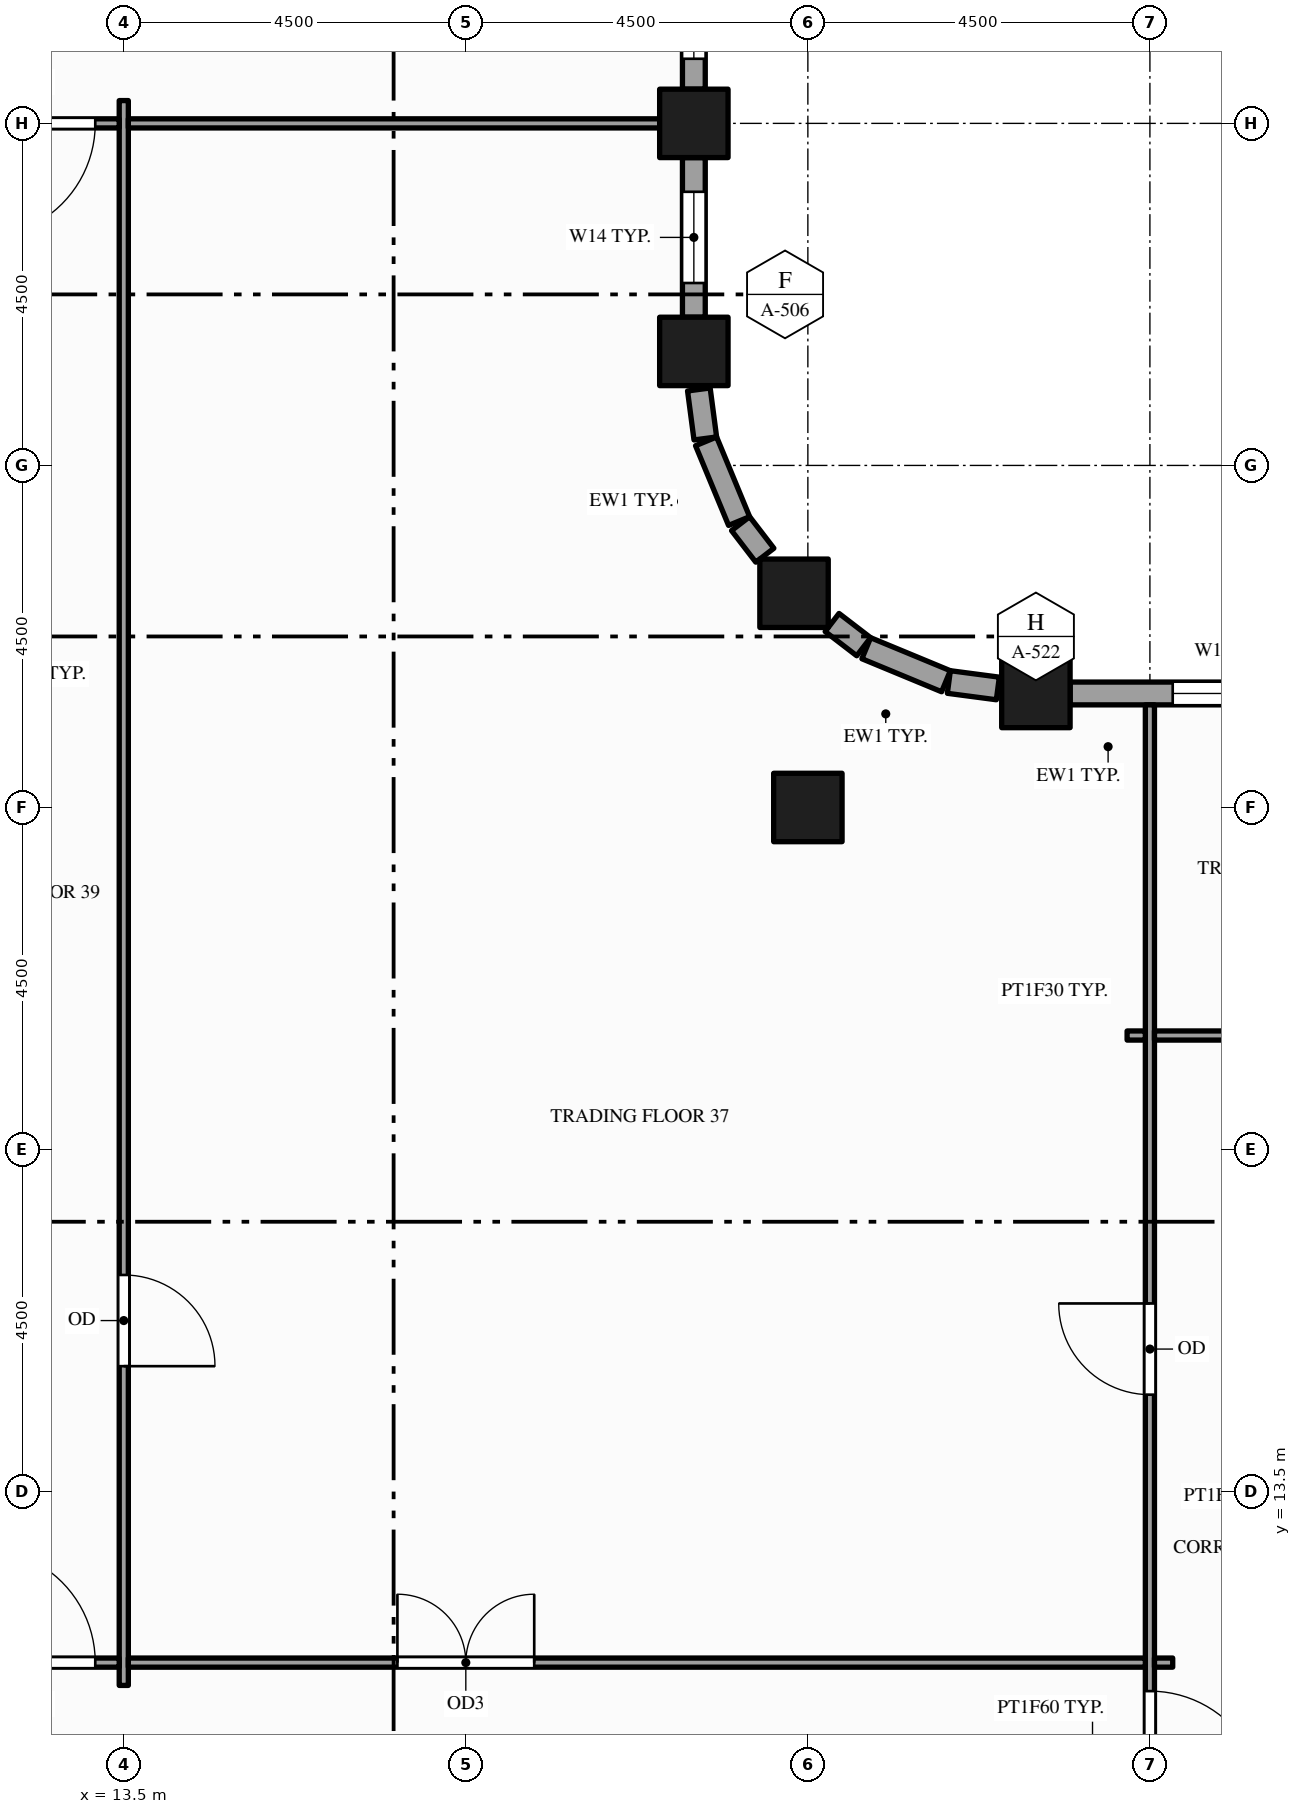
"""IFC4 building model, lengths in metres.
Left out: names, types, materials, properties, quantities, classifications, styles, units other than length and angle.
Written with IfcOpenShell. Run it as: python <this file> out.ifc"""

import sys

from ifc_helpers import new_model, si_unit, direction, frame, frame_2d, origin, origin_2d, place, context, subcontext, project, spatial, rectangle, hollow_rectangle, extrude, element, fill, save


model = new_model("IFC4")
c1 = context("Model", 3, precision=1e-05, world=origin(), true_north=direction((0.0, 1.0)))
c2 = subcontext(c1, "Body", "Model", "MODEL_VIEW")
j1 = project(units=[si_unit("LENGTHUNIT", "METRE"), si_unit("PLANEANGLEUNIT", "RADIAN")], contexts=[c1])
p1 = place(None, origin())
s1 = spatial("IfcSite", under=j1, at=p1, CompositionType="ELEMENT")
p2 = place(p1, origin())
s2 = spatial("IfcBuilding", under=s1, at=p2, CompositionType="ELEMENT")
p3 = place(p2, frame((0.0, 0.0, 183.0)))
s3 = spatial("IfcBuildingStorey", under=s2, at=p3, CompositionType="ELEMENT", Elevation=183.0)
for number, where, z_axis, x_axis in (
    (1, (21.0, 28.5, -0.15), (0.0, 0.0, 1.0), (1.0, 0.0, 0.0)),
    (2, (21.0, 31.5, -0.15), (0.0, 0.0, 1.0), (1.0, 0.0, 0.0)),
    (3, (22.318, 25.318, -0.15), (0.0, 0.0, 1.0), (1.0, 0.0, 0.0)),
    (4, (22.5, 22.5, -0.15), (0.0, 0.0, 1.0), (1.0, 0.0, 0.0)),
    (5, (25.5, 24.0, -0.15), (0.0, 0.0, 1.0), (1.0, 0.0, 0.0)),
):
    element("IfcColumn", number, at=place(p3, frame(where, z_axis=z_axis, x_axis=x_axis)), inside=s3, PredefinedType="COLUMN", context=c2, shape_type="SweptSolid", body=[
        extrude(hollow_rectangle(XDim=0.9, YDim=0.9, WallThickness=0.045, at=origin_2d()), origin(), (0.0, 0.0, 1.0), 3.9),
    ])
p4 = place(p3, frame((31.05, 24.0, 0.0), z_axis=(0.0, 0.0, 1.0), x_axis=(-1.0, 0.0, 0.0)))
e6 = element("IfcWall", 6, at=p4, inside=s3, PredefinedType="STANDARD", context=c2, shape_type="SweptSolid", body=[
    extrude(rectangle(XDim=5.1, YDim=0.3, at=frame_2d((2.55, 0.0))), origin(), (0.0, 0.0, 1.0), 3.049),
])
p5 = place(p4, frame((0.4, 0.0, 0.9)))
e7 = element("IfcOpeningElement", 7, at=p5, cuts=e6, PredefinedType="OPENING", context=c2, shape_type="SweptSolid", body=[
    extrude(rectangle(XDim=1.1, YDim=2.0, at=frame_2d((0.55, 1.0))), frame((0.0, 0.16, 0.0), z_axis=(0.0, -1.0, 0.0), x_axis=(1.0, 0.0, 0.0)), (0.0, 0.0, 1.0), 0.32),
])
p6 = place(p4, frame((2.1, 0.0, 0.9)))
e8 = element("IfcOpeningElement", 8, at=p6, cuts=e6, PredefinedType="OPENING", context=c2, shape_type="SweptSolid", body=[
    extrude(rectangle(XDim=1.65, YDim=2.0, at=frame_2d((0.825, 1.0))), frame((0.0, 0.16, 0.0), z_axis=(0.0, -1.0, 0.0), x_axis=(1.0, 0.0, 0.0)), (0.0, 0.0, 1.0), 0.32),
])
p7 = place(p3, frame((25.0, 24.066, 0.0), z_axis=(0.0, 0.0, 1.0), x_axis=(-0.991423590996, 0.130687655177, 0.0)))
e9 = element("IfcWall", 9, at=p7, inside=s3, PredefinedType="STANDARD", context=c2, shape_type="SweptSolid", body=[
    extrude(rectangle(XDim=0.65, YDim=0.3, at=frame_2d((0.325, 0.0))), origin(), (0.0, 0.0, 1.0), 2.35),
])
p8 = place(p3, frame((24.317, 24.161, 0.0), z_axis=(0.0, 0.0, 1.0), x_axis=(-0.923914616768, 0.382598720491, 0.0)))
e10 = element("IfcWall", 10, at=p8, inside=s3, PredefinedType="STANDARD", context=c2, shape_type="SweptSolid", body=[
    extrude(rectangle(XDim=1.135, YDim=0.3, at=frame_2d((0.568, 0.0))), origin(), (0.0, 0.0, 1.0), 2.35),
])
for number, where, z_axis, x_axis in (
    (11, (23.234, 24.615, 0.0), (0.0, 0.0, 1.0), (-0.794, 0.609, 0.0)),
    (12, (21.934, 25.819, 0.0), (0.0, 0.0, 1.0), (-0.609, 0.794, 0.0)),
):
    element("IfcWall", number, at=place(p3, frame(where, z_axis=z_axis, x_axis=x_axis)), inside=s3, PredefinedType="STANDARD", context=c2, shape_type="SweptSolid", body=[
        extrude(rectangle(XDim=0.524, YDim=0.3, at=frame_2d((0.262, 0.0))), origin(), (0.0, 0.0, 1.0), 3.049),
    ])
p9 = place(p3, frame((21.595, 26.268, 0.0), z_axis=(0.0, 0.0, 1.0), x_axis=(-0.382598720491, 0.923914616768, 0.0)))
e13 = element("IfcWall", 13, at=p9, inside=s3, PredefinedType="STANDARD", context=c2, shape_type="SweptSolid", body=[
    extrude(rectangle(XDim=1.135, YDim=0.3, at=frame_2d((0.568, 0.0))), origin(), (0.0, 0.0, 1.0), 3.049),
])
p10 = place(p3, frame((21.151, 27.355, 0.0), z_axis=(0.0, 0.0, 1.0), x_axis=(-0.130687655177, 0.991423590996, 0.0)))
e14 = element("IfcWall", 14, at=p10, inside=s3, PredefinedType="STANDARD", context=c2, shape_type="SweptSolid", body=[
    extrude(rectangle(XDim=0.65, YDim=0.3, at=frame_2d((0.325, 0.0))), origin(), (0.0, 0.0, 1.0), 3.049),
])
p11 = place(p3, frame((21.0, 28.95, 0.0), z_axis=(0.0, 0.0, 1.0), x_axis=(0.0, 1.0, 0.0)))
e15 = element("IfcWall", 15, at=p11, inside=s3, PredefinedType="STANDARD", context=c2, shape_type="SweptSolid", body=[
    extrude(rectangle(XDim=2.1, YDim=0.3, at=frame_2d((1.05, 0.0))), origin(), (0.0, 0.0, 1.0), 3.049),
])
p12 = place(p11, frame((0.45, 0.0, 0.9)))
e16 = element("IfcOpeningElement", 16, at=p12, cuts=e15, PredefinedType="OPENING", context=c2, shape_type="SweptSolid", body=[
    extrude(rectangle(XDim=1.2, YDim=2.0, at=frame_2d((0.6, 1.0))), frame((0.0, 0.16, 0.0), z_axis=(0.0, -1.0, 0.0), x_axis=(1.0, 0.0, 0.0)), (0.0, 0.0, 1.0), 0.32),
])
p13 = place(p3, frame((21.0, 31.95, 0.0), z_axis=(0.0, 0.0, 1.0), x_axis=(0.0, 1.0, 0.0)))
e17 = element("IfcWall", 17, at=p13, inside=s3, PredefinedType="STANDARD", context=c2, shape_type="SweptSolid", body=[
    extrude(rectangle(XDim=4.05, YDim=0.3, at=frame_2d((2.025, 0.0))), origin(), (0.0, 0.0, 1.0), 3.049),
])
p14 = place(p13, frame((0.4, 0.0, 0.9)))
e18 = element("IfcOpeningElement", 18, at=p14, cuts=e17, PredefinedType="OPENING", context=c2, shape_type="SweptSolid", body=[
    extrude(rectangle(XDim=1.1, YDim=2.0, at=frame_2d((0.55, 1.0))), frame((0.0, 0.16, 0.0), z_axis=(0.0, -1.0, 0.0), x_axis=(1.0, 0.0, 0.0)), (0.0, 0.0, 1.0), 0.32),
])
p15 = place(p13, frame((2.1, 0.0, 0.9)))
e19 = element("IfcOpeningElement", 19, at=p15, cuts=e17, PredefinedType="OPENING", context=c2, shape_type="SweptSolid", body=[
    extrude(rectangle(XDim=1.55, YDim=2.0, at=frame_2d((0.775, 1.0))), frame((0.0, 0.16, 0.0), z_axis=(0.0, -1.0, 0.0), x_axis=(1.0, 0.0, 0.0)), (0.0, 0.0, 1.0), 0.32),
])
p16 = place(p3, frame((13.5, 10.95, 0.0), z_axis=(0.0, 0.0, 1.0), x_axis=(0.0, 1.0, 0.0)))
e20 = element("IfcWall", 20, at=p16, inside=s3, PredefinedType="PARTITIONING", context=c2, shape_type="SweptSolid", body=[
    extrude(rectangle(XDim=20.85, YDim=0.12, at=frame_2d((10.425, 0.0))), origin(), (0.0, 0.0, 1.0), 2.5),
])
p17 = place(p16, frame((4.2, 0.0, 0.0)))
e21 = element("IfcOpeningElement", 21, at=p17, cuts=e20, PredefinedType="OPENING", context=c2, shape_type="SweptSolid", body=[
    extrude(rectangle(XDim=1.2, YDim=2.1, at=frame_2d((0.6, 1.05))), frame((0.0, 0.07, 0.0), z_axis=(0.0, -1.0, 0.0), x_axis=(1.0, 0.0, 0.0)), (0.0, 0.0, 1.0), 0.14),
])
p18 = place(p3, frame((27.0, 1.65, 0.0), z_axis=(0.0, 0.0, 1.0), x_axis=(0.0, 1.0, 0.0)))
e22 = element("IfcWall", 22, at=p18, inside=s3, PredefinedType="PARTITIONING", context=c2, shape_type="SweptSolid", body=[
    extrude(rectangle(XDim=22.2, YDim=0.12, at=frame_2d((11.1, 0.0))), origin(), (0.0, 0.0, 1.0), 2.35),
])
p19 = place(p18, frame((7.725, 0.0, 0.0)))
e23 = element("IfcOpeningElement", 23, at=p19, cuts=e22, PredefinedType="OPENING", context=c2, shape_type="SweptSolid", body=[
    extrude(rectangle(XDim=1.5, YDim=2.1, at=frame_2d((0.75, 1.05))), frame((0.0, 0.07, 0.0), z_axis=(0.0, -1.0, 0.0), x_axis=(1.0, 0.0, 0.0)), (0.0, 0.0, 1.0), 0.14),
])
p20 = place(p18, frame((13.125, 0.0, 0.0)))
e24 = element("IfcOpeningElement", 24, at=p20, cuts=e22, PredefinedType="OPENING", context=c2, shape_type="SweptSolid", body=[
    extrude(rectangle(XDim=1.2, YDim=2.1, at=frame_2d((0.6, 1.05))), frame((0.0, 0.07, 0.0), z_axis=(0.0, -1.0, 0.0), x_axis=(1.0, 0.0, 0.0)), (0.0, 0.0, 1.0), 0.14),
])
p21 = place(p3, frame((11.31, 11.25, 0.0), z_axis=(0.0, 0.0, 1.0), x_axis=(1.0, 0.0, 0.0)))
e25 = element("IfcWall", 25, at=p21, inside=s3, PredefinedType="PARTITIONING", context=c2, shape_type="SweptSolid", body=[
    extrude(rectangle(XDim=2.13, YDim=0.12, at=frame_2d((1.065, 0.0))), origin(), (0.0, 0.0, 1.0), 2.77),
])
p22 = place(p21, frame((0.315, 0.0, 0.0)))
e26 = element("IfcOpeningElement", 26, at=p22, cuts=e25, PredefinedType="OPENING", context=c2, shape_type="SweptSolid", body=[
    extrude(rectangle(XDim=1.5, YDim=2.1, at=frame_2d((0.75, 1.05))), frame((0.0, 0.07, 0.0), z_axis=(0.0, -1.0, 0.0), x_axis=(1.0, 0.0, 0.0)), (0.0, 0.0, 1.0), 0.14),
])
p23 = place(p3, frame((13.56, 11.25, 0.0), z_axis=(0.0, 0.0, 1.0), x_axis=(1.0, 0.0, 0.0)))
e27 = element("IfcWall", 27, at=p23, inside=s3, PredefinedType="PARTITIONING", context=c2, shape_type="SweptSolid", body=[
    extrude(rectangle(XDim=13.38, YDim=0.12, at=frame_2d((6.69, 0.0))), origin(), (0.0, 0.0, 1.0), 2.77),
])
p24 = place(p23, frame((3.54, 0.0, 0.0)))
e28 = element("IfcOpeningElement", 28, at=p24, cuts=e27, PredefinedType="OPENING", context=c2, shape_type="SweptSolid", body=[
    extrude(rectangle(XDim=1.8, YDim=2.1, at=frame_2d((0.9, 1.05))), frame((0.0, 0.07, 0.0), z_axis=(0.0, -1.0, 0.0), x_axis=(1.0, 0.0, 0.0)), (0.0, 0.0, 1.0), 0.14),
])
for number, where, z_axis, x_axis in (
    (29, (27.06, 11.25, 0.0), (0.0, 0.0, 1.0), (1.0, 0.0, 0.0)),
    (30, (26.7, 19.5, 0.0), (0.0, 0.0, 1.0), (1.0, 0.0, 0.0)),
):
    element("IfcWall", number, at=place(p3, frame(where, z_axis=z_axis, x_axis=x_axis)), inside=s3, PredefinedType="PARTITIONING", context=c2, shape_type="SweptSolid", body=[
        extrude(rectangle(XDim=0.24, YDim=0.12, at=frame_2d((0.12, 0.0))), origin(), (0.0, 0.0, 1.0), 2.77),
    ])
p25 = place(p3, frame((27.06, 19.5, 0.0), z_axis=(0.0, 0.0, 1.0), x_axis=(1.0, 0.0, 0.0)))
e31 = element("IfcWall", 31, at=p25, inside=s3, PredefinedType="PARTITIONING", context=c2, shape_type="SweptSolid", body=[
    extrude(rectangle(XDim=2.13, YDim=0.12, at=frame_2d((1.065, 0.0))), origin(), (0.0, 0.0, 1.0), 2.77),
])
p26 = place(p3, frame((11.31, 31.5, 0.0), z_axis=(0.0, 0.0, 1.0), x_axis=(1.0, 0.0, 0.0)))
e32 = element("IfcWall", 32, at=p26, inside=s3, PredefinedType="PARTITIONING", context=c2, shape_type="SweptSolid", body=[
    extrude(rectangle(XDim=2.13, YDim=0.12, at=frame_2d((1.065, 0.0))), origin(), (0.0, 0.0, 1.0), 2.77),
])
p27 = place(p26, frame((0.315, 0.0, 0.0)))
e33 = element("IfcOpeningElement", 33, at=p27, cuts=e32, PredefinedType="OPENING", context=c2, shape_type="SweptSolid", body=[
    extrude(rectangle(XDim=1.5, YDim=2.1, at=frame_2d((0.75, 1.05))), frame((0.0, 0.07, 0.0), z_axis=(0.0, -1.0, 0.0), x_axis=(1.0, 0.0, 0.0)), (0.0, 0.0, 1.0), 0.14),
])
p28 = place(p3, frame((13.56, 31.5, 0.0), z_axis=(0.0, 0.0, 1.0), x_axis=(1.0, 0.0, 0.0)))
e34 = element("IfcWall", 34, at=p28, inside=s3, PredefinedType="PARTITIONING", context=c2, shape_type="SweptSolid", body=[
    extrude(rectangle(XDim=7.29, YDim=0.12, at=frame_2d((3.645, 0.0))), origin(), (0.0, 0.0, 1.0), 2.77),
])
p29 = place(p6, origin())
e35 = element("IfcWindow", 35, at=p29, inside=s3, PartitioningType="SINGLE_PANEL", PredefinedType="WINDOW", context=c2, shape_type="SweptSolid", body=[
    extrude(rectangle(XDim=1.65, YDim=2.0, at=frame_2d((0.825, 1.0))), frame((0.0, 0.03, 0.0), z_axis=(0.0, -1.0, 0.0), x_axis=(1.0, 0.0, 0.0)), (0.0, 0.0, 1.0), 0.06),
])
fill(e8, e35)
p30 = place(p12, origin())
e36 = element("IfcWindow", 36, at=p30, inside=s3, PartitioningType="SINGLE_PANEL", PredefinedType="WINDOW", context=c2, shape_type="SweptSolid", body=[
    extrude(rectangle(XDim=1.2, YDim=2.0, at=frame_2d((0.6, 1.0))), frame((0.0, 0.03, 0.0), z_axis=(0.0, -1.0, 0.0), x_axis=(1.0, 0.0, 0.0)), (0.0, 0.0, 1.0), 0.06),
])
fill(e16, e36)
p31 = place(p14, origin())
e37 = element("IfcWindow", 37, at=p31, inside=s3, PartitioningType="SINGLE_PANEL", PredefinedType="WINDOW", context=c2, shape_type="SweptSolid", body=[
    extrude(rectangle(XDim=1.1, YDim=2.0, at=frame_2d((0.55, 1.0))), frame((0.0, 0.03, 0.0), z_axis=(0.0, -1.0, 0.0), x_axis=(1.0, 0.0, 0.0)), (0.0, 0.0, 1.0), 0.06),
])
fill(e18, e37)
p32 = place(p19, origin())
e38 = element("IfcDoor", 38, at=p32, inside=s3, OperationType="SINGLE_SWING_LEFT", PredefinedType="DOOR", context=c2, shape_type="SweptSolid", body=[
    extrude(rectangle(XDim=1.5, YDim=2.1, at=frame_2d((0.75, 1.05))), frame((0.0, 0.025, 0.0), z_axis=(0.0, -1.0, 0.0), x_axis=(1.0, 0.0, 0.0)), (0.0, 0.0, 1.0), 0.05),
])
fill(e23, e38)
p33 = place(p24, origin())
e39 = element("IfcDoor", 39, at=p33, inside=s3, OperationType="DOUBLE_DOOR_SINGLE_SWING", PredefinedType="DOOR", context=c2, shape_type="SweptSolid", body=[
    extrude(rectangle(XDim=1.8, YDim=2.1, at=frame_2d((0.9, 1.05))), frame((0.0, 0.025, 0.0), z_axis=(0.0, -1.0, 0.0), x_axis=(1.0, 0.0, 0.0)), (0.0, 0.0, 1.0), 0.05),
])
fill(e28, e39)
p34 = place(p22, origin())
e40 = element("IfcDoor", 40, at=p34, inside=s3, OperationType="SINGLE_SWING_LEFT", PredefinedType="DOOR", context=c2, shape_type="SweptSolid", body=[
    extrude(rectangle(XDim=1.5, YDim=2.1, at=frame_2d((0.75, 1.05))), frame((0.0, 0.025, 0.0), z_axis=(0.0, -1.0, 0.0), x_axis=(1.0, 0.0, 0.0)), (0.0, 0.0, 1.0), 0.05),
])
fill(e26, e40)
p35 = place(p27, origin())
e41 = element("IfcDoor", 41, at=p35, inside=s3, OperationType="SINGLE_SWING_LEFT", PredefinedType="DOOR", context=c2, shape_type="SweptSolid", body=[
    extrude(rectangle(XDim=1.5, YDim=2.1, at=frame_2d((0.75, 1.05))), frame((0.0, 0.025, 0.0), z_axis=(0.0, -1.0, 0.0), x_axis=(1.0, 0.0, 0.0)), (0.0, 0.0, 1.0), 0.05),
])
fill(e33, e41)
p36 = place(p17, origin())
e42 = element("IfcDoor", 42, at=p36, inside=s3, OperationType="SINGLE_SWING_LEFT", PredefinedType="DOOR", context=c2, shape_type="SweptSolid", body=[
    extrude(rectangle(XDim=1.2, YDim=2.1, at=frame_2d((0.6, 1.05))), frame((0.0, 0.025, 0.0), z_axis=(0.0, -1.0, 0.0), x_axis=(1.0, 0.0, 0.0)), (0.0, 0.0, 1.0), 0.05),
])
fill(e21, e42)
p37 = place(p20, origin())
e43 = element("IfcDoor", 43, at=p37, inside=s3, OperationType="SINGLE_SWING_RIGHT", PredefinedType="DOOR", context=c2, shape_type="SweptSolid", body=[
    extrude(rectangle(XDim=1.2, YDim=2.1, at=frame_2d((0.6, 1.05))), frame((0.0, 0.025, 0.0), z_axis=(0.0, -1.0, 0.0), x_axis=(1.0, 0.0, 0.0)), (0.0, 0.0, 1.0), 0.05),
])
fill(e24, e43)
save(model, sys.argv[1])
